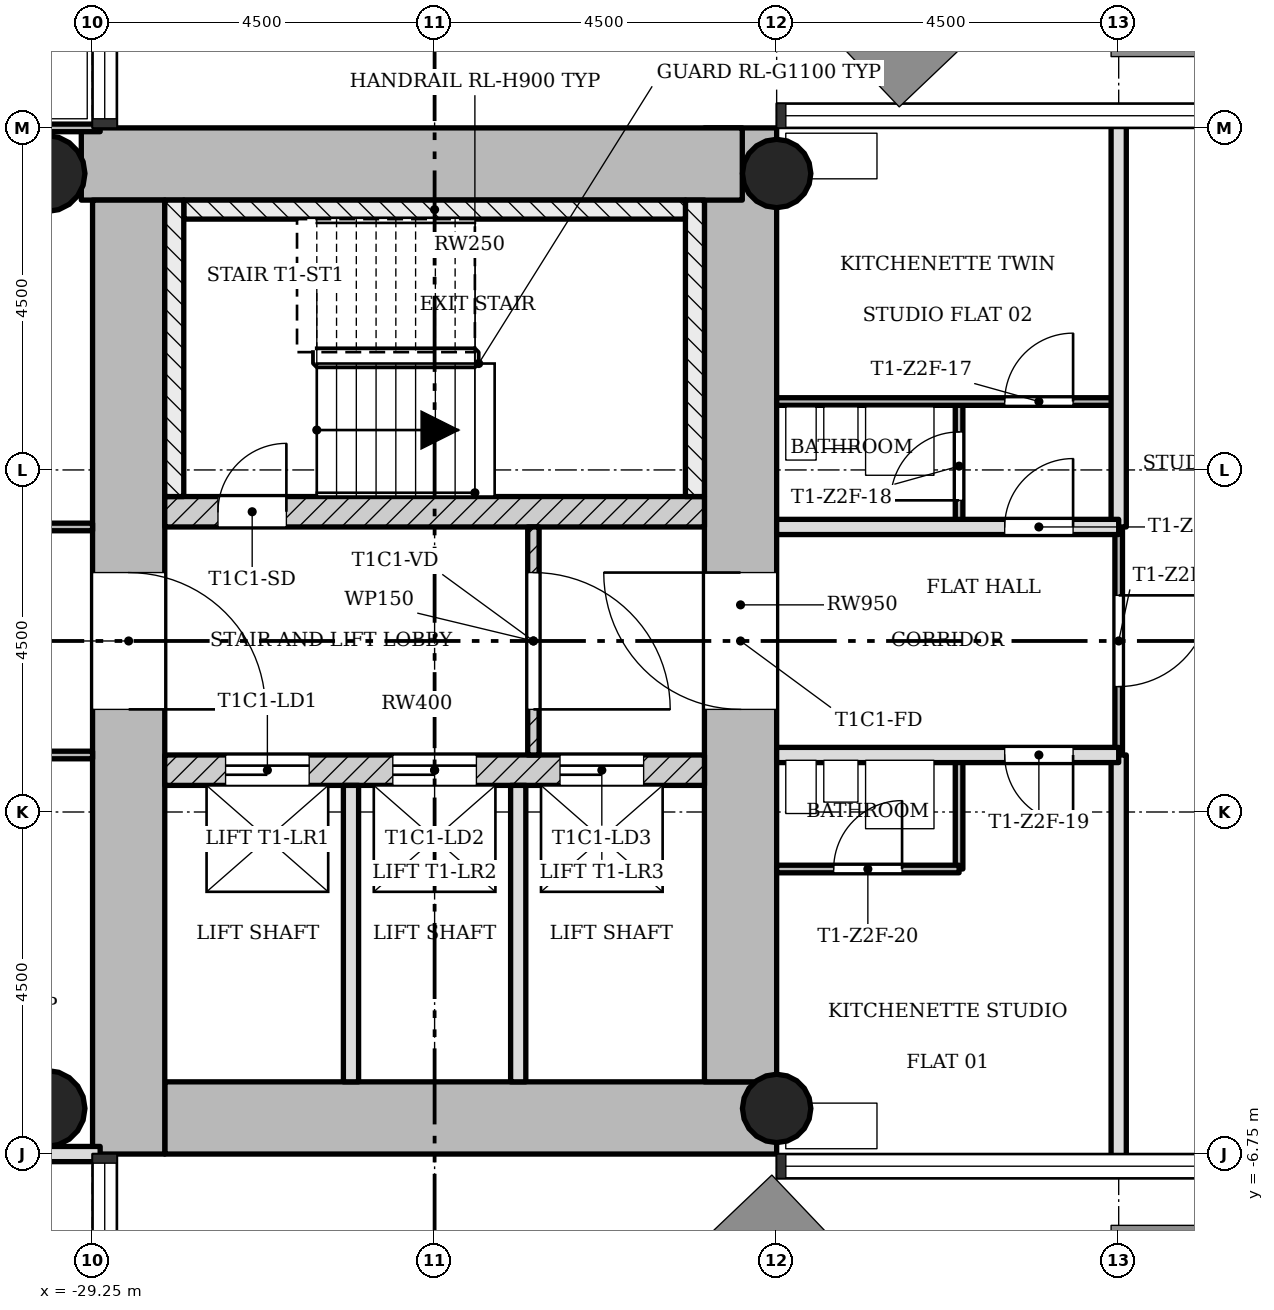
"""IFC4 building model, lengths in metres.
Left out: names, types, materials, properties, quantities, classifications, styles, units other than length and angle.
Written with IfcOpenShell. Run it as: python <this file> out.ifc"""

import sys

from ifc_helpers import new_model, si_unit, direction, frame, frame_2d, origin, origin_2d, place, context, subcontext, project, spatial, rectangle, hollow_circle, extrude, element, fill, save


model = new_model("IFC4")
c1 = context("Model", 3, precision=1e-05, world=origin(), true_north=direction((0.0, 1.0)))
c2 = subcontext(c1, "Body", "Model", "MODEL_VIEW")
j1 = project(units=[si_unit("LENGTHUNIT", "METRE"), si_unit("PLANEANGLEUNIT", "RADIAN")], contexts=[c1])
p1 = place(None, origin())
s1 = spatial("IfcSite", under=j1, at=p1, CompositionType="ELEMENT")
p2 = place(p1, origin())
s2 = spatial("IfcBuilding", under=s1, at=p2, CompositionType="ELEMENT")
p3 = place(p2, frame((0.0, 0.0, 114.0)))
s3 = spatial("IfcBuildingStorey", under=s2, at=p3, CompositionType="ELEMENT", Elevation=114.0)
p4 = place(p3, frame((-28.3, -6.275, 0.0), z_axis=(0.0, 0.0, 1.0), x_axis=(1.0, 0.0, 0.0)))
e1 = element("IfcWall", 1, at=p4, inside=s3, PredefinedType="SHEAR", context=c2, shape_type="SweptSolid", body=[
    extrude(rectangle(XDim=8.05, YDim=0.95, at=frame_2d((4.025, 0.0))), origin(), (0.0, 0.0, 1.0), 3.4),
])
p5 = place(p3, frame((-20.725, -5.8, 0.0), z_axis=(0.0, 0.0, 1.0), x_axis=(0.0, 1.0, 0.0)))
e2 = element("IfcWall", 2, at=p5, inside=s3, PredefinedType="SHEAR", context=c2, shape_type="SweptSolid", body=[
    extrude(rectangle(XDim=12.55, YDim=0.95, at=frame_2d((6.275, 0.0))), origin(), (0.0, 0.0, 1.0), 3.4),
])
p6 = place(p5, frame((4.9, 0.0, 0.0)))
e3 = element("IfcOpeningElement", 3, at=p6, cuts=e2, PredefinedType="OPENING", context=c2, shape_type="SweptSolid", body=[
    extrude(rectangle(XDim=1.8, YDim=2.1, at=frame_2d((0.9, 1.05))), frame((0.0, 0.485, 0.0), z_axis=(0.0, -1.0, 0.0), x_axis=(1.0, 0.0, 0.0)), (0.0, 0.0, 1.0), 0.97),
])
p7 = place(p3, frame((-20.702, 6.275, 0.0), z_axis=(0.0, 0.0, 1.0), x_axis=(-1.0, 0.0, 0.0)))
e4 = element("IfcWall", 4, at=p7, inside=s3, PredefinedType="SHEAR", context=c2, shape_type="SweptSolid", body=[
    extrude(rectangle(XDim=8.696, YDim=0.95, at=frame_2d((4.348, 0.0))), origin(), (0.0, 0.0, 1.0), 3.4),
])
p8 = place(p3, frame((-28.775, 5.8, 0.0), z_axis=(0.0, 0.0, 1.0), x_axis=(0.0, -1.0, 0.0)))
e5 = element("IfcWall", 5, at=p8, inside=s3, PredefinedType="SHEAR", context=c2, shape_type="SweptSolid", body=[
    extrude(rectangle(XDim=12.55, YDim=0.95, at=frame_2d((6.275, 0.0))), origin(), (0.0, 0.0, 1.0), 3.4),
])
p9 = place(p8, frame((4.9, 0.0, 0.0)))
e6 = element("IfcOpeningElement", 6, at=p9, cuts=e5, PredefinedType="OPENING", context=c2, shape_type="SweptSolid", body=[
    extrude(rectangle(XDim=1.8, YDim=2.1, at=frame_2d((0.9, 1.05))), frame((0.0, 0.485, 0.0), z_axis=(0.0, -1.0, 0.0), x_axis=(1.0, 0.0, 0.0)), (0.0, 0.0, 1.0), 0.97),
])
p10 = place(p3, frame((-28.3, -1.7, 0.0), z_axis=(0.0, 0.0, 1.0), x_axis=(1.0, 0.0, 0.0)))
e7 = element("IfcWall", 7, at=p10, inside=s3, PredefinedType="SHEAR", context=c2, shape_type="SweptSolid", body=[
    extrude(rectangle(XDim=7.1, YDim=0.4, at=frame_2d((3.55, 0.0))), origin(), (0.0, 0.0, 1.0), 3.4),
])
p11 = place(p10, frame((0.8, 0.0, 0.0)))
e8 = element("IfcOpeningElement", 8, at=p11, cuts=e7, PredefinedType="OPENING", context=c2, shape_type="SweptSolid", body=[
    extrude(rectangle(XDim=1.1, YDim=2.1, at=frame_2d((0.55, 1.05))), frame((0.0, 0.21, 0.0), z_axis=(0.0, -1.0, 0.0), x_axis=(1.0, 0.0, 0.0)), (0.0, 0.0, 1.0), 0.42),
])
p12 = place(p10, frame((3.0, 0.0, 0.0)))
e9 = element("IfcOpeningElement", 9, at=p12, cuts=e7, PredefinedType="OPENING", context=c2, shape_type="SweptSolid", body=[
    extrude(rectangle(XDim=1.1, YDim=2.1, at=frame_2d((0.55, 1.05))), frame((0.0, 0.21, 0.0), z_axis=(0.0, -1.0, 0.0), x_axis=(1.0, 0.0, 0.0)), (0.0, 0.0, 1.0), 0.42),
])
p13 = place(p10, frame((5.2, 0.0, 0.0)))
e10 = element("IfcOpeningElement", 10, at=p13, cuts=e7, PredefinedType="OPENING", context=c2, shape_type="SweptSolid", body=[
    extrude(rectangle(XDim=1.1, YDim=2.1, at=frame_2d((0.55, 1.05))), frame((0.0, 0.21, 0.0), z_axis=(0.0, -1.0, 0.0), x_axis=(1.0, 0.0, 0.0)), (0.0, 0.0, 1.0), 0.42),
])
p14 = place(p3, frame((-28.3, 1.7, 0.0), z_axis=(0.0, 0.0, 1.0), x_axis=(1.0, 0.0, 0.0)))
e11 = element("IfcWall", 11, at=p14, inside=s3, PredefinedType="SHEAR", context=c2, shape_type="SweptSolid", body=[
    extrude(rectangle(XDim=7.1, YDim=0.4, at=frame_2d((3.55, 0.0))), origin(), (0.0, 0.0, 1.0), 3.4),
])
p15 = place(p14, frame((0.7, 0.0, 0.0)))
e12 = element("IfcOpeningElement", 12, at=p15, cuts=e11, PredefinedType="OPENING", context=c2, shape_type="SweptSolid", body=[
    extrude(rectangle(XDim=0.9, YDim=2.1, at=frame_2d((0.45, 1.05))), frame((0.0, 0.21, 0.0), z_axis=(0.0, -1.0, 0.0), x_axis=(1.0, 0.0, 0.0)), (0.0, 0.0, 1.0), 0.42),
])
for number, where, z_axis, x_axis in (
    (13, (-20.25, -6.15, 0.0), (0.0, 0.0, 1.0), (1.0, 0.0, 0.0)),
    (14, (-20.25, 6.15, 0.0), (0.0, 0.0, 1.0), (1.0, 0.0, 0.0)),
):
    element("IfcColumn", number, at=place(p3, frame(where, z_axis=z_axis, x_axis=x_axis)), inside=s3, PredefinedType="COLUMN", context=c2, shape_type="SweptSolid", body=[
        extrude(hollow_circle(Radius=0.45, WallThickness=0.032, at=origin_2d()), origin(), (0.0, 0.0, 1.0), 3.4),
    ])
for number, where, z_axis, x_axis in (
    (15, (-29.85, -6.15, 0.0), (0.0, 0.0, 1.0), (1.0, 0.0, 0.0)),
    (16, (-29.85, 6.15, 0.0), (0.0, 0.0, 1.0), (1.0, 0.0, 0.0)),
):
    element("IfcColumn", number, at=place(p3, frame(where, z_axis=z_axis, x_axis=x_axis)), inside=s3, PredefinedType="COLUMN", context=c2, shape_type="SweptSolid", body=[
        extrude(hollow_circle(Radius=0.5, WallThickness=0.036, at=origin_2d()), origin(), (0.0, 0.0, 1.0), 3.4),
    ])
p16 = place(p3, frame((-23.45, -1.5, 0.0), z_axis=(0.0, 0.0, 1.0), x_axis=(0.0, 1.0, 0.0)))
e17 = element("IfcWall", 17, at=p16, inside=s3, PredefinedType="PARTITIONING", context=c2, shape_type="SweptSolid", body=[
    extrude(rectangle(XDim=3.0, YDim=0.15, at=frame_2d((1.5, 0.0))), origin(), (0.0, 0.0, 1.0), 3.0),
])
p17 = place(p16, frame((0.6, 0.0, 0.0)))
e18 = element("IfcOpeningElement", 18, at=p17, cuts=e17, PredefinedType="OPENING", context=c2, shape_type="SweptSolid", body=[
    extrude(rectangle(XDim=1.8, YDim=2.1, at=frame_2d((0.9, 1.05))), frame((0.0, 0.085, 0.0), z_axis=(0.0, -1.0, 0.0), x_axis=(1.0, 0.0, 0.0)), (0.0, 0.0, 1.0), 0.17),
])
for number, where, z_axis, x_axis in (
    (19, (-25.85, -5.8, 0.0), (0.0, 0.0, 1.0), (0.0, 1.0, 0.0)),
    (20, (-23.65, -5.8, 0.0), (0.0, 0.0, 1.0), (0.0, 1.0, 0.0)),
):
    element("IfcWall", number, at=place(p3, frame(where, z_axis=z_axis, x_axis=x_axis)), inside=s3, PredefinedType="SOLIDWALL", context=c2, shape_type="SweptSolid", body=[
        extrude(rectangle(XDim=3.9, YDim=0.2, at=frame_2d((1.95, 0.0))), origin(), (0.0, 0.0, 1.0), 3.0),
    ])
p18 = place(p3, frame((-17.85, -3.0, 0.0), z_axis=(0.0, 0.0, 1.0), x_axis=(0.0, 1.0, 0.0)))
e21 = element("IfcWall", 21, at=p18, inside=s3, PredefinedType="PARTITIONING", context=c2, shape_type="SweptSolid", body=[
    extrude(rectangle(XDim=1.5, YDim=0.1, at=frame_2d((0.75, 0.0))), origin(), (0.0, 0.0, 1.0), 3.0),
])
p19 = place(p3, frame((-17.85, 1.5, 0.0), z_axis=(0.0, 0.0, 1.0), x_axis=(0.0, 1.0, 0.0)))
e22 = element("IfcWall", 22, at=p19, inside=s3, PredefinedType="PARTITIONING", context=c2, shape_type="SweptSolid", body=[
    extrude(rectangle(XDim=1.65, YDim=0.1, at=frame_2d((0.825, 0.0))), origin(), (0.0, 0.0, 1.0), 3.0),
])
p20 = place(p19, frame((0.35, 0.0, 0.0)))
e23 = element("IfcOpeningElement", 23, at=p20, cuts=e22, PredefinedType="OPENING", context=c2, shape_type="SweptSolid", body=[
    extrude(rectangle(XDim=0.9, YDim=2.1, at=frame_2d((0.45, 1.05))), frame((0.0, 0.06, 0.0), z_axis=(0.0, -1.0, 0.0), x_axis=(1.0, 0.0, 0.0)), (0.0, 0.0, 1.0), 0.12),
])
p21 = place(p3, frame((-15.75, -1.5, 0.0), z_axis=(0.0, 0.0, 1.0), x_axis=(0.0, 1.0, 0.0)))
e24 = element("IfcWall", 24, at=p21, inside=s3, PredefinedType="PARTITIONING", context=c2, shape_type="SweptSolid", body=[
    extrude(rectangle(XDim=3.0, YDim=0.1, at=frame_2d((1.5, 0.0))), origin(), (0.0, 0.0, 1.0), 3.0),
])
p22 = place(p21, frame((0.9, 0.0, 0.0)))
e25 = element("IfcOpeningElement", 25, at=p22, cuts=e24, PredefinedType="OPENING", context=c2, shape_type="SweptSolid", body=[
    extrude(rectangle(XDim=1.2, YDim=2.1, at=frame_2d((0.6, 1.05))), frame((0.0, 0.06, 0.0), z_axis=(0.0, -1.0, 0.0), x_axis=(1.0, 0.0, 0.0)), (0.0, 0.0, 1.0), 0.12),
])
for number, where, z_axis, x_axis in (
    (26, (-15.75, -6.85, 0.0), (0.0, 0.0, 1.0), (0.0, 1.0, 0.0)),
    (27, (-15.75, 1.5, 0.0), (0.0, 0.0, 1.0), (0.0, 1.0, 0.0)),
):
    element("IfcWall", number, at=place(p3, frame(where, z_axis=z_axis, x_axis=x_axis)), inside=s3, PredefinedType="SOLIDWALL", context=c2, shape_type="SweptSolid", body=[
        extrude(rectangle(XDim=5.35, YDim=0.2, at=frame_2d((2.675, 0.0))), origin(), (0.0, 0.0, 1.0), 3.0),
    ])
p23 = place(p3, frame((-35.1, -6.75, 0.0), z_axis=(0.0, 0.0, 1.0), x_axis=(1.0, 0.0, 0.0)))
e28 = element("IfcWall", 28, at=p23, inside=s3, PredefinedType="SOLIDWALL", context=c2, shape_type="SweptSolid", body=[
    extrude(rectangle(XDim=5.95, YDim=0.2, at=frame_2d((2.975, 0.0))), origin(), (0.0, 0.0, 1.0), 3.0),
])
p24 = place(p3, frame((-20.25, -3.0, 0.0), z_axis=(0.0, 0.0, 1.0), x_axis=(1.0, 0.0, 0.0)))
e29 = element("IfcWall", 29, at=p24, inside=s3, PredefinedType="PARTITIONING", context=c2, shape_type="SweptSolid", body=[
    extrude(rectangle(XDim=2.4, YDim=0.1, at=frame_2d((1.2, 0.0))), origin(), (0.0, 0.0, 1.0), 3.0),
])
p25 = place(p24, frame((0.75, 0.0, 0.0)))
e30 = element("IfcOpeningElement", 30, at=p25, cuts=e29, PredefinedType="OPENING", context=c2, shape_type="SweptSolid", body=[
    extrude(rectangle(XDim=0.9, YDim=2.1, at=frame_2d((0.45, 1.05))), frame((0.0, 0.06, 0.0), z_axis=(0.0, -1.0, 0.0), x_axis=(1.0, 0.0, 0.0)), (0.0, 0.0, 1.0), 0.12),
])
p26 = place(p3, frame((-35.1, -1.5, 0.0), z_axis=(0.0, 0.0, 1.0), x_axis=(1.0, 0.0, 0.0)))
e31 = element("IfcWall", 31, at=p26, inside=s3, PredefinedType="PARTITIONING", context=c2, shape_type="SweptSolid", body=[
    extrude(rectangle(XDim=5.85, YDim=0.1, at=frame_2d((2.925, 0.0))), origin(), (0.0, 0.0, 1.0), 3.0),
])
p27 = place(p26, frame((4.125, 0.0, 0.0)))
e32 = element("IfcOpeningElement", 32, at=p27, cuts=e31, PredefinedType="OPENING", context=c2, shape_type="SweptSolid", body=[
    extrude(rectangle(XDim=0.9, YDim=2.1, at=frame_2d((0.45, 1.05))), frame((0.0, 0.06, 0.0), z_axis=(0.0, -1.0, 0.0), x_axis=(1.0, 0.0, 0.0)), (0.0, 0.0, 1.0), 0.12),
])
p28 = place(p3, frame((-20.25, -1.5, 0.0), z_axis=(0.0, 0.0, 1.0), x_axis=(1.0, 0.0, 0.0)))
e33 = element("IfcWall", 33, at=p28, inside=s3, PredefinedType="SOLIDWALL", context=c2, shape_type="SweptSolid", body=[
    extrude(rectangle(XDim=4.5, YDim=0.2, at=frame_2d((2.25, 0.0))), origin(), (0.0, 0.0, 1.0), 3.0),
])
p29 = place(p28, frame((3.0, 0.0, 0.0)))
e34 = element("IfcOpeningElement", 34, at=p29, cuts=e33, PredefinedType="OPENING", context=c2, shape_type="SweptSolid", body=[
    extrude(rectangle(XDim=0.9, YDim=2.1, at=frame_2d((0.45, 1.05))), frame((0.0, 0.11, 0.0), z_axis=(0.0, -1.0, 0.0), x_axis=(1.0, 0.0, 0.0)), (0.0, 0.0, 1.0), 0.22),
])
p30 = place(p3, frame((-35.1, 1.5, 0.0), z_axis=(0.0, 0.0, 1.0), x_axis=(1.0, 0.0, 0.0)))
e35 = element("IfcWall", 35, at=p30, inside=s3, PredefinedType="PARTITIONING", context=c2, shape_type="SweptSolid", body=[
    extrude(rectangle(XDim=5.85, YDim=0.1, at=frame_2d((2.925, 0.0))), origin(), (0.0, 0.0, 1.0), 3.0),
])
p31 = place(p30, frame((3.675, 0.0, 0.0)))
e36 = element("IfcOpeningElement", 36, at=p31, cuts=e35, PredefinedType="OPENING", context=c2, shape_type="SweptSolid", body=[
    extrude(rectangle(XDim=0.9, YDim=2.1, at=frame_2d((0.45, 1.05))), frame((0.0, 0.06, 0.0), z_axis=(0.0, -1.0, 0.0), x_axis=(1.0, 0.0, 0.0)), (0.0, 0.0, 1.0), 0.12),
])
p32 = place(p3, frame((-20.25, 1.5, 0.0), z_axis=(0.0, 0.0, 1.0), x_axis=(1.0, 0.0, 0.0)))
e37 = element("IfcWall", 37, at=p32, inside=s3, PredefinedType="SOLIDWALL", context=c2, shape_type="SweptSolid", body=[
    extrude(rectangle(XDim=4.5, YDim=0.2, at=frame_2d((2.25, 0.0))), origin(), (0.0, 0.0, 1.0), 3.0),
])
p33 = place(p32, frame((3.0, 0.0, 0.0)))
e38 = element("IfcOpeningElement", 38, at=p33, cuts=e37, PredefinedType="OPENING", context=c2, shape_type="SweptSolid", body=[
    extrude(rectangle(XDim=0.9, YDim=2.1, at=frame_2d((0.45, 1.05))), frame((0.0, 0.11, 0.0), z_axis=(0.0, -1.0, 0.0), x_axis=(1.0, 0.0, 0.0)), (0.0, 0.0, 1.0), 0.22),
])
p34 = place(p3, frame((-20.25, 3.15, 0.0), z_axis=(0.0, 0.0, 1.0), x_axis=(1.0, 0.0, 0.0)))
e39 = element("IfcWall", 39, at=p34, inside=s3, PredefinedType="PARTITIONING", context=c2, shape_type="SweptSolid", body=[
    extrude(rectangle(XDim=4.5, YDim=0.1, at=frame_2d((2.25, 0.0))), origin(), (0.0, 0.0, 1.0), 3.0),
])
p35 = place(p34, frame((3.0, 0.0, 0.0)))
e40 = element("IfcOpeningElement", 40, at=p35, cuts=e39, PredefinedType="OPENING", context=c2, shape_type="SweptSolid", body=[
    extrude(rectangle(XDim=0.9, YDim=2.1, at=frame_2d((0.45, 1.05))), frame((0.0, 0.06, 0.0), z_axis=(0.0, -1.0, 0.0), x_axis=(1.0, 0.0, 0.0)), (0.0, 0.0, 1.0), 0.12),
])
p36 = place(p3, frame((-35.1, 6.75, 0.0), z_axis=(0.0, 0.0, 1.0), x_axis=(1.0, 0.0, 0.0)))
e41 = element("IfcWall", 41, at=p36, inside=s3, PredefinedType="PARTITIONING", context=c2, shape_type="SweptSolid", body=[
    extrude(rectangle(XDim=5.95, YDim=0.1, at=frame_2d((2.975, 0.0))), origin(), (0.0, 0.0, 1.0), 3.0),
])
p37 = place(p3, frame((-21.325, 1.9, 0.0), z_axis=(0.0, 0.0, 1.0), x_axis=(0.0, 1.0, 0.0)))
e42 = element("IfcWall", 42, at=p37, inside=s3, PredefinedType="SHEAR", context=c2, shape_type="SweptSolid", body=[
    extrude(rectangle(XDim=3.9, YDim=0.25, at=frame_2d((1.95, 0.0))), origin(), (0.0, 0.0, 1.0), 3.4),
])
p38 = place(p3, frame((-28.05, 5.675, 0.0), z_axis=(0.0, 0.0, 1.0), x_axis=(1.0, 0.0, 0.0)))
e43 = element("IfcWall", 43, at=p38, inside=s3, PredefinedType="SHEAR", context=c2, shape_type="SweptSolid", body=[
    extrude(rectangle(XDim=6.6, YDim=0.25, at=frame_2d((3.3, 0.0))), origin(), (0.0, 0.0, 1.0), 3.4),
])
p39 = place(p3, frame((-28.175, 1.9, 0.0), z_axis=(0.0, 0.0, 1.0), x_axis=(0.0, 1.0, 0.0)))
e44 = element("IfcWall", 44, at=p39, inside=s3, PredefinedType="SHEAR", context=c2, shape_type="SweptSolid", body=[
    extrude(rectangle(XDim=3.9, YDim=0.25, at=frame_2d((1.95, 0.0))), origin(), (0.0, 0.0, 1.0), 3.4),
])
p40 = place(p17, origin())
e45 = element("IfcDoor", 45, at=p40, inside=s3, OperationType="SINGLE_SWING_LEFT", PredefinedType="DOOR", context=c2, shape_type="SweptSolid", body=[
    extrude(rectangle(XDim=1.8, YDim=2.1, at=frame_2d((0.9, 1.05))), frame((0.0, 0.025, 0.0), z_axis=(0.0, -1.0, 0.0), x_axis=(1.0, 0.0, 0.0)), (0.0, 0.0, 1.0), 0.05),
])
fill(e18, e45)
p41 = place(p33, origin())
e46 = element("IfcDoor", 46, at=p41, inside=s3, OperationType="SINGLE_SWING_LEFT", PredefinedType="DOOR", context=c2, shape_type="SweptSolid", body=[
    extrude(rectangle(XDim=0.9, YDim=2.1, at=frame_2d((0.45, 1.05))), frame((0.0, 0.025, 0.0), z_axis=(0.0, -1.0, 0.0), x_axis=(1.0, 0.0, 0.0)), (0.0, 0.0, 1.0), 0.05),
])
fill(e38, e46)
p42 = place(p35, origin())
e47 = element("IfcDoor", 47, at=p42, inside=s3, OperationType="SINGLE_SWING_LEFT", PredefinedType="DOOR", context=c2, shape_type="SweptSolid", body=[
    extrude(rectangle(XDim=0.9, YDim=2.1, at=frame_2d((0.45, 1.05))), frame((0.0, 0.025, 0.0), z_axis=(0.0, -1.0, 0.0), x_axis=(1.0, 0.0, 0.0)), (0.0, 0.0, 1.0), 0.05),
])
fill(e40, e47)
p43 = place(p20, origin())
e48 = element("IfcDoor", 48, at=p43, inside=s3, OperationType="SINGLE_SWING_RIGHT", PredefinedType="DOOR", context=c2, shape_type="SweptSolid", body=[
    extrude(rectangle(XDim=0.9, YDim=2.1, at=frame_2d((0.45, 1.05))), frame((0.0, 0.025, 0.0), z_axis=(0.0, -1.0, 0.0), x_axis=(1.0, 0.0, 0.0)), (0.0, 0.0, 1.0), 0.05),
])
fill(e23, e48)
p44 = place(p29, origin())
e49 = element("IfcDoor", 49, at=p44, inside=s3, OperationType="SINGLE_SWING_RIGHT", PredefinedType="DOOR", context=c2, shape_type="SweptSolid", body=[
    extrude(rectangle(XDim=0.9, YDim=2.1, at=frame_2d((0.45, 1.05))), frame((0.0, 0.025, 0.0), z_axis=(0.0, -1.0, 0.0), x_axis=(1.0, 0.0, 0.0)), (0.0, 0.0, 1.0), 0.05),
])
fill(e34, e49)
p45 = place(p25, origin())
e50 = element("IfcDoor", 50, at=p45, inside=s3, OperationType="SINGLE_SWING_LEFT", PredefinedType="DOOR", context=c2, shape_type="SweptSolid", body=[
    extrude(rectangle(XDim=0.9, YDim=2.1, at=frame_2d((0.45, 1.05))), frame((0.0, 0.025, 0.0), z_axis=(0.0, -1.0, 0.0), x_axis=(1.0, 0.0, 0.0)), (0.0, 0.0, 1.0), 0.05),
])
fill(e30, e50)
p46 = place(p22, origin())
e51 = element("IfcDoor", 51, at=p46, inside=s3, OperationType="SINGLE_SWING_RIGHT", PredefinedType="DOOR", context=c2, shape_type="SweptSolid", body=[
    extrude(rectangle(XDim=1.2, YDim=2.1, at=frame_2d((0.6, 1.05))), frame((0.0, 0.025, 0.0), z_axis=(0.0, -1.0, 0.0), x_axis=(1.0, 0.0, 0.0)), (0.0, 0.0, 1.0), 0.05),
])
fill(e25, e51)
p47 = place(p15, origin())
e52 = element("IfcDoor", 52, at=p47, inside=s3, OperationType="SINGLE_SWING_LEFT", PredefinedType="DOOR", context=c2, shape_type="SweptSolid", body=[
    extrude(rectangle(XDim=0.9, YDim=2.1, at=frame_2d((0.45, 1.05))), frame((0.0, 0.025, 0.0), z_axis=(0.0, -1.0, 0.0), x_axis=(1.0, 0.0, 0.0)), (0.0, 0.0, 1.0), 0.05),
])
fill(e12, e52)
p48 = place(p11, origin())
e53 = element("IfcDoor", 53, at=p48, inside=s3, OperationType="SLIDING_TO_LEFT", PredefinedType="DOOR", context=c2, shape_type="SweptSolid", body=[
    extrude(rectangle(XDim=1.1, YDim=2.1, at=frame_2d((0.55, 1.05))), frame((0.0, 0.025, 0.0), z_axis=(0.0, -1.0, 0.0), x_axis=(1.0, 0.0, 0.0)), (0.0, 0.0, 1.0), 0.05),
])
fill(e8, e53)
p49 = place(p12, origin())
e54 = element("IfcDoor", 54, at=p49, inside=s3, OperationType="SLIDING_TO_LEFT", PredefinedType="DOOR", context=c2, shape_type="SweptSolid", body=[
    extrude(rectangle(XDim=1.1, YDim=2.1, at=frame_2d((0.55, 1.05))), frame((0.0, 0.025, 0.0), z_axis=(0.0, -1.0, 0.0), x_axis=(1.0, 0.0, 0.0)), (0.0, 0.0, 1.0), 0.05),
])
fill(e9, e54)
p50 = place(p13, origin())
e55 = element("IfcDoor", 55, at=p50, inside=s3, OperationType="SLIDING_TO_LEFT", PredefinedType="DOOR", context=c2, shape_type="SweptSolid", body=[
    extrude(rectangle(XDim=1.1, YDim=2.1, at=frame_2d((0.55, 1.05))), frame((0.0, 0.025, 0.0), z_axis=(0.0, -1.0, 0.0), x_axis=(1.0, 0.0, 0.0)), (0.0, 0.0, 1.0), 0.05),
])
fill(e10, e55)
p51 = place(p9, origin())
e56 = element("IfcDoor", 56, at=p51, inside=s3, OperationType="SINGLE_SWING_LEFT", PredefinedType="DOOR", context=c2, shape_type="SweptSolid", body=[
    extrude(rectangle(XDim=1.8, YDim=2.1, at=frame_2d((0.9, 1.05))), frame((0.0, 0.025, 0.0), z_axis=(0.0, -1.0, 0.0), x_axis=(1.0, 0.0, 0.0)), (0.0, 0.0, 1.0), 0.05),
])
fill(e6, e56)
p52 = place(p6, origin())
e57 = element("IfcDoor", 57, at=p52, inside=s3, OperationType="SINGLE_SWING_LEFT", PredefinedType="DOOR", context=c2, shape_type="SweptSolid", body=[
    extrude(rectangle(XDim=1.8, YDim=2.1, at=frame_2d((0.9, 1.05))), frame((0.0, 0.025, 0.0), z_axis=(0.0, -1.0, 0.0), x_axis=(1.0, 0.0, 0.0)), (0.0, 0.0, 1.0), 0.05),
])
fill(e3, e57)
save(model, sys.argv[1])
